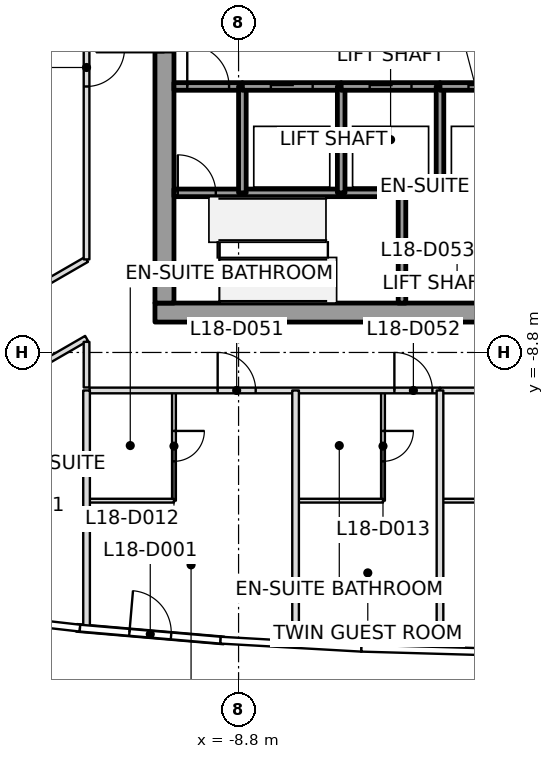
"""IFC4 building model, lengths in metres.
Left out: names, types, materials, properties, quantities, classifications, styles, units other than length and angle.
Written with IfcOpenShell. Run it as: python <this file> out.ifc"""

import sys

from ifc_helpers import new_model, si_unit, direction, frame, frame_2d, origin, place, context, subcontext, project, spatial, rectangle, extrude, element, fill, save


model = new_model("IFC4")
c1 = context("Model", 3, precision=1e-05, world=origin(), true_north=direction((0.0, 1.0)))
c2 = subcontext(c1, "Body", "Model", "MODEL_VIEW")
j1 = project(units=[si_unit("LENGTHUNIT", "METRE"), si_unit("PLANEANGLEUNIT", "RADIAN")], contexts=[c1])
p1 = place(None, origin())
s1 = spatial("IfcSite", under=j1, at=p1, CompositionType="ELEMENT")
p2 = place(p1, origin())
s2 = spatial("IfcBuilding", under=s1, at=p2, CompositionType="ELEMENT")
p3 = place(p2, frame((0.0, 0.0, 88.7)))
s3 = spatial("IfcBuildingStorey", under=s2, at=p3, CompositionType="ELEMENT", Elevation=88.7)
p4 = place(p3, frame((-11.0, -7.75, 0.0), z_axis=(0.0, 0.0, 1.0), x_axis=(1.0, 0.0, 0.0)))
e1 = element("IfcWall", 1, at=p4, inside=s3, PredefinedType="SHEAR", context=c2, shape_type="SweptSolid", body=[
    extrude(rectangle(XDim=22.0, YDim=0.5, at=frame_2d((11.0, 0.0))), origin(), (0.0, 0.0, 1.0), 3.7),
])
p5 = place(p4, frame((10.45, 0.0, 0.0)))
e2 = element("IfcOpeningElement", 2, at=p5, cuts=e1, PredefinedType="OPENING", context=c2, shape_type="SweptSolid", body=[
    extrude(rectangle(XDim=1.1, YDim=2.1, at=frame_2d((0.55, 1.05))), frame((0.0, 0.25, 0.0), z_axis=(0.0, -1.0, 0.0), x_axis=(1.0, 0.0, 0.0)), (0.0, 0.0, 1.0), 0.5),
])
p6 = place(p3, frame((-10.75, -7.5, 0.0), z_axis=(0.0, 0.0, 1.0), x_axis=(0.0, 1.0, 0.0)))
e3 = element("IfcWall", 3, at=p6, inside=s3, PredefinedType="SHEAR", context=c2, shape_type="SweptSolid", body=[
    extrude(rectangle(XDim=15.0, YDim=0.5, at=frame_2d((7.5, 0.0))), origin(), (0.0, 0.0, 1.0), 3.7),
])
p7 = place(p6, frame((6.6, 0.0, 0.0)))
e4 = element("IfcOpeningElement", 4, at=p7, cuts=e3, PredefinedType="OPENING", context=c2, shape_type="SweptSolid", body=[
    extrude(rectangle(XDim=1.8, YDim=2.1, at=frame_2d((0.9, 1.05))), frame((0.0, 0.25, 0.0), z_axis=(0.0, -1.0, 0.0), x_axis=(1.0, 0.0, 0.0)), (0.0, 0.0, 1.0), 0.5),
])
p8 = place(p3, frame((-13.063, -16.047, 0.0), z_axis=(0.0, 0.0, 1.0), x_axis=(0.996355943682, -0.085292634444, 0.0)))
e5 = element("IfcWall", 5, at=p8, inside=s3, PredefinedType="SOLIDWALL", context=c2, shape_type="SweptSolid", body=[
    extrude(rectangle(XDim=3.893, YDim=0.2, at=frame_2d((1.946, 0.0))), origin(), (0.0, 0.0, 1.0), 3.017),
])
p9 = place(p8, frame((1.396, 0.0, 0.0)))
e6 = element("IfcOpeningElement", 6, at=p9, cuts=e5, PredefinedType="OPENING", context=c2, shape_type="SweptSolid", body=[
    extrude(rectangle(XDim=1.1, YDim=2.1, at=frame_2d((0.55, 1.05))), frame((0.0, 0.1, 0.0), z_axis=(0.0, -1.0, 0.0), x_axis=(1.0, 0.0, 0.0)), (0.0, 0.0, 1.0), 0.2),
])
p10 = place(p3, frame((-10.5, -4.6, 0.0), z_axis=(0.0, 0.0, 1.0), x_axis=(1.0, 0.0, 0.0)))
e7 = element("IfcWall", 7, at=p10, inside=s3, PredefinedType="SOLIDWALL", context=c2, shape_type="SweptSolid", body=[
    extrude(rectangle(XDim=1.8, YDim=0.2, at=frame_2d((0.9, 0.0))), origin(), (0.0, 0.0, 1.0), 3.55),
])
p11 = place(p10, frame((0.1, 0.0, 0.0)))
e8 = element("IfcOpeningElement", 8, at=p11, cuts=e7, PredefinedType="OPENING", context=c2, shape_type="SweptSolid", body=[
    extrude(rectangle(XDim=1.0, YDim=2.1, at=frame_2d((0.5, 1.05))), frame((0.0, 0.1, 0.0), z_axis=(0.0, -1.0, 0.0), x_axis=(1.0, 0.0, 0.0)), (0.0, 0.0, 1.0), 0.2),
])
p12 = place(p3, frame((-10.5, -1.8, 0.0), z_axis=(0.0, 0.0, 1.0), x_axis=(1.0, 0.0, 0.0)))
e9 = element("IfcWall", 9, at=p12, inside=s3, PredefinedType="SOLIDWALL", context=c2, shape_type="SweptSolid", body=[
    extrude(rectangle(XDim=1.8, YDim=0.2, at=frame_2d((0.9, 0.0))), origin(), (0.0, 0.0, 1.0), 3.55),
])
p13 = place(p12, frame((0.35, 0.0, 0.0)))
e10 = element("IfcOpeningElement", 10, at=p13, cuts=e9, PredefinedType="OPENING", context=c2, shape_type="SweptSolid", body=[
    extrude(rectangle(XDim=1.1, YDim=2.1, at=frame_2d((0.55, 1.05))), frame((0.0, 0.1, 0.0), z_axis=(0.0, -1.0, 0.0), x_axis=(1.0, 0.0, 0.0)), (0.0, 0.0, 1.0), 0.2),
])
p14 = place(p3, frame((-8.7, -4.6, 0.0), z_axis=(0.0, 0.0, 1.0), x_axis=(1.0, 0.0, 0.0)))
e11 = element("IfcWall", 11, at=p14, inside=s3, PredefinedType="SOLIDWALL", context=c2, shape_type="SweptSolid", body=[
    extrude(rectangle(XDim=2.6, YDim=0.2, at=frame_2d((1.3, 0.0))), origin(), (0.0, 0.0, 1.0), 3.55),
])
p15 = place(p3, frame((-8.7, -4.6, 0.0), z_axis=(0.0, 0.0, 1.0), x_axis=(0.0, 1.0, 0.0)))
e12 = element("IfcWall", 12, at=p15, inside=s3, PredefinedType="SOLIDWALL", context=c2, shape_type="SweptSolid", body=[
    extrude(rectangle(XDim=2.8, YDim=0.2, at=frame_2d((1.4, 0.0))), origin(), (0.0, 0.0, 1.0), 3.55),
])
p16 = place(p3, frame((-8.7, -1.8, 0.0), z_axis=(0.0, 0.0, 1.0), x_axis=(1.0, 0.0, 0.0)))
e13 = element("IfcWall", 13, at=p16, inside=s3, PredefinedType="SOLIDWALL", context=c2, shape_type="SweptSolid", body=[
    extrude(rectangle(XDim=2.6, YDim=0.2, at=frame_2d((1.3, 0.0))), origin(), (0.0, 0.0, 1.0), 3.55),
])
p17 = place(p16, frame((0.75, 0.0, 0.0)))
e14 = element("IfcOpeningElement", 14, at=p17, cuts=e13, PredefinedType="OPENING", context=c2, shape_type="SweptSolid", body=[
    extrude(rectangle(XDim=1.1, YDim=2.1, at=frame_2d((0.55, 1.05))), frame((0.0, 0.1, 0.0), z_axis=(0.0, -1.0, 0.0), x_axis=(1.0, 0.0, 0.0)), (0.0, 0.0, 1.0), 0.2),
])
p18 = place(p3, frame((-6.1, -4.6, 0.0), z_axis=(0.0, 0.0, 1.0), x_axis=(1.0, 0.0, 0.0)))
e15 = element("IfcWall", 15, at=p18, inside=s3, PredefinedType="SOLIDWALL", context=c2, shape_type="SweptSolid", body=[
    extrude(rectangle(XDim=1.6, YDim=0.2, at=frame_2d((0.8, 0.0))), origin(), (0.0, 0.0, 1.0), 3.55),
])
p19 = place(p3, frame((-6.1, -4.6, 0.0), z_axis=(0.0, 0.0, 1.0), x_axis=(0.0, 1.0, 0.0)))
e16 = element("IfcWall", 16, at=p19, inside=s3, PredefinedType="SOLIDWALL", context=c2, shape_type="SweptSolid", body=[
    extrude(rectangle(XDim=2.8, YDim=0.2, at=frame_2d((1.4, 0.0))), origin(), (0.0, 0.0, 1.0), 3.55),
])
p20 = place(p3, frame((-6.1, -1.8, 0.0), z_axis=(0.0, 0.0, 1.0), x_axis=(1.0, 0.0, 0.0)))
e17 = element("IfcWall", 17, at=p20, inside=s3, PredefinedType="SOLIDWALL", context=c2, shape_type="SweptSolid", body=[
    extrude(rectangle(XDim=2.6, YDim=0.2, at=frame_2d((1.3, 0.0))), origin(), (0.0, 0.0, 1.0), 3.55),
])
p21 = place(p20, frame((0.75, 0.0, 0.0)))
e18 = element("IfcOpeningElement", 18, at=p21, cuts=e17, PredefinedType="OPENING", context=c2, shape_type="SweptSolid", body=[
    extrude(rectangle(XDim=1.1, YDim=2.1, at=frame_2d((0.55, 1.05))), frame((0.0, 0.1, 0.0), z_axis=(0.0, -1.0, 0.0), x_axis=(1.0, 0.0, 0.0)), (0.0, 0.0, 1.0), 0.2),
])
p22 = place(p3, frame((-4.5, -4.6, 0.0), z_axis=(0.0, 0.0, 1.0), x_axis=(0.0, -1.0, 0.0)))
e19 = element("IfcWall", 19, at=p22, inside=s3, PredefinedType="SOLIDWALL", context=c2, shape_type="SweptSolid", body=[
    extrude(rectangle(XDim=2.9, YDim=0.2, at=frame_2d((1.45, 0.0))), origin(), (0.0, 0.0, 1.0), 3.55),
])
p23 = place(p3, frame((-4.5, -4.6, 0.0), z_axis=(0.0, 0.0, 1.0), x_axis=(1.0, 0.0, 0.0)))
e20 = element("IfcWall", 20, at=p23, inside=s3, PredefinedType="SOLIDWALL", context=c2, shape_type="SweptSolid", body=[
    extrude(rectangle(XDim=1.0, YDim=0.2, at=frame_2d((0.5, 0.0))), origin(), (0.0, 0.0, 1.0), 3.55),
])
p24 = place(p3, frame((-3.5, -4.6, 0.0), z_axis=(0.0, 0.0, 1.0), x_axis=(1.0, 0.0, 0.0)))
e21 = element("IfcWall", 21, at=p24, inside=s3, PredefinedType="SOLIDWALL", context=c2, shape_type="SweptSolid", body=[
    extrude(rectangle(XDim=1.9, YDim=0.2, at=frame_2d((0.95, 0.0))), origin(), (0.0, 0.0, 1.0), 3.55),
])
p25 = place(p3, frame((-3.5, -4.6, 0.0), z_axis=(0.0, 0.0, 1.0), x_axis=(0.0, 1.0, 0.0)))
e22 = element("IfcWall", 22, at=p25, inside=s3, PredefinedType="SOLIDWALL", context=c2, shape_type="SweptSolid", body=[
    extrude(rectangle(XDim=2.8, YDim=0.2, at=frame_2d((1.4, 0.0))), origin(), (0.0, 0.0, 1.0), 3.55),
])
p26 = place(p3, frame((-3.5, -1.8, 0.0), z_axis=(0.0, 0.0, 1.0), x_axis=(1.0, 0.0, 0.0)))
e23 = element("IfcWall", 23, at=p26, inside=s3, PredefinedType="SOLIDWALL", context=c2, shape_type="SweptSolid", body=[
    extrude(rectangle(XDim=2.6, YDim=0.2, at=frame_2d((1.3, 0.0))), origin(), (0.0, 0.0, 1.0), 3.55),
])
p27 = place(p26, frame((0.75, 0.0, 0.0)))
e24 = element("IfcOpeningElement", 24, at=p27, cuts=e23, PredefinedType="OPENING", context=c2, shape_type="SweptSolid", body=[
    extrude(rectangle(XDim=1.1, YDim=2.1, at=frame_2d((0.55, 1.05))), frame((0.0, 0.1, 0.0), z_axis=(0.0, -1.0, 0.0), x_axis=(1.0, 0.0, 0.0)), (0.0, 0.0, 1.0), 0.2),
])
p28 = place(p3, frame((-12.8, -9.8, 0.0), z_axis=(0.0, 0.0, 1.0), x_axis=(0.0, -1.0, 0.0)))
e25 = element("IfcWall", 25, at=p28, inside=s3, PredefinedType="PARTITIONING", context=c2, shape_type="SweptSolid", body=[
    extrude(rectangle(XDim=6.271, YDim=0.175, at=frame_2d((3.135, 0.0))), origin(), (0.0, 0.0, 1.0), 3.15),
])
p29 = place(p3, frame((-7.3, -9.8, 0.0), z_axis=(0.0, 0.0, 1.0), x_axis=(0.0, -1.0, 0.0)))
e26 = element("IfcWall", 26, at=p29, inside=s3, PredefinedType="PARTITIONING", context=c2, shape_type="SweptSolid", body=[
    extrude(rectangle(XDim=6.696, YDim=0.175, at=frame_2d((3.348, 0.0))), origin(), (0.0, 0.0, 1.0), 3.15),
])
p30 = place(p3, frame((-3.5, -9.8, 0.0), z_axis=(0.0, 0.0, 1.0), x_axis=(0.0, -1.0, 0.0)))
e27 = element("IfcWall", 27, at=p30, inside=s3, PredefinedType="PARTITIONING", context=c2, shape_type="SweptSolid", body=[
    extrude(rectangle(XDim=6.853, YDim=0.175, at=frame_2d((3.427, 0.0))), origin(), (0.0, 0.0, 1.0), 3.15),
])
p31 = place(p3, frame((-12.8, -6.351, 0.0), z_axis=(0.0, 0.0, 1.0), x_axis=(-0.86602308164, -0.500004022051, 0.0)))
e28 = element("IfcWall", 28, at=p31, inside=s3, PredefinedType="PARTITIONING", context=c2, shape_type="SweptSolid", body=[
    extrude(rectangle(XDim=12.059, YDim=0.15, at=frame_2d((6.03, 0.0))), origin(), (0.0, 0.0, 1.0), 2.947),
])
p32 = place(p31, frame((10.809, 0.0, 0.0)))
e29 = element("IfcOpeningElement", 29, at=p32, cuts=e28, PredefinedType="OPENING", context=c2, shape_type="SweptSolid", body=[
    extrude(rectangle(XDim=1.0, YDim=2.1, at=frame_2d((0.5, 1.05))), frame((0.0, 0.075, 0.0), z_axis=(0.0, -1.0, 0.0), x_axis=(1.0, 0.0, 0.0)), (0.0, 0.0, 1.0), 0.15),
])
p33 = place(p3, frame((-22.274, -13.899, 0.0), z_axis=(0.0, 0.0, 1.0), x_axis=(0.866012401956, 0.500022519152, 0.0)))
e30 = element("IfcWall", 30, at=p33, inside=s3, PredefinedType="PARTITIONING", context=c2, shape_type="SweptSolid", body=[
    extrude(rectangle(XDim=10.94, YDim=0.15, at=frame_2d((5.47, 0.0))), origin(), (0.0, 0.0, 1.0), 2.797),
])
p34 = place(p33, frame((7.34, 0.0, 0.0)))
e31 = element("IfcOpeningElement", 31, at=p34, cuts=e30, PredefinedType="OPENING", context=c2, shape_type="SweptSolid", body=[
    extrude(rectangle(XDim=1.0, YDim=2.1, at=frame_2d((0.5, 1.05))), frame((0.0, 0.075, 0.0), z_axis=(0.0, -1.0, 0.0), x_axis=(1.0, 0.0, 0.0)), (0.0, 0.0, 1.0), 0.15),
])
p35 = place(p3, frame((-12.8, -8.521, 0.0), z_axis=(0.0, 0.0, 1.0), x_axis=(0.0, -1.0, 0.0)))
e32 = element("IfcWall", 32, at=p35, inside=s3, PredefinedType="PARTITIONING", context=c2, shape_type="SweptSolid", body=[
    extrude(rectangle(XDim=1.199, YDim=0.15, at=frame_2d((0.6, 0.0))), origin(), (0.0, 0.0, 1.0), 2.797),
])
p36 = place(p3, frame((-12.8, 9.72, 0.0), z_axis=(0.0, 0.0, 1.0), x_axis=(0.0, -1.0, 0.0)))
e33 = element("IfcWall", 33, at=p36, inside=s3, PredefinedType="PARTITIONING", context=c2, shape_type="SweptSolid", body=[
    extrude(rectangle(XDim=16.071, YDim=0.15, at=frame_2d((8.035, 0.0))), origin(), (0.0, 0.0, 1.0), 2.947),
])
p37 = place(p36, frame((1.245, 0.0, 0.0)))
e34 = element("IfcOpeningElement", 34, at=p37, cuts=e33, PredefinedType="OPENING", context=c2, shape_type="SweptSolid", body=[
    extrude(rectangle(XDim=1.0, YDim=2.1, at=frame_2d((0.5, 1.05))), frame((0.0, 0.075, 0.0), z_axis=(0.0, -1.0, 0.0), x_axis=(1.0, 0.0, 0.0)), (0.0, 0.0, 1.0), 0.15),
])
p38 = place(p36, frame((10.521, 0.0, 0.0)))
e35 = element("IfcOpeningElement", 35, at=p38, cuts=e33, PredefinedType="OPENING", context=c2, shape_type="SweptSolid", body=[
    extrude(rectangle(XDim=1.0, YDim=2.1, at=frame_2d((0.5, 1.05))), frame((0.0, 0.075, 0.0), z_axis=(0.0, -1.0, 0.0), x_axis=(1.0, 0.0, 0.0)), (0.0, 0.0, 1.0), 0.15),
])
p39 = place(p3, frame((-12.72, -9.8, 0.0), z_axis=(0.0, 0.0, 1.0), x_axis=(1.0, 0.0, 0.0)))
e36 = element("IfcWall", 36, at=p39, inside=s3, PredefinedType="PARTITIONING", context=c2, shape_type="SweptSolid", body=[
    extrude(rectangle(XDim=9.22, YDim=0.15, at=frame_2d((4.61, 0.0))), origin(), (0.0, 0.0, 1.0), 3.017),
])
p40 = place(p39, frame((3.37, 0.0, 0.0)))
e37 = element("IfcOpeningElement", 37, at=p40, cuts=e36, PredefinedType="OPENING", context=c2, shape_type="SweptSolid", body=[
    extrude(rectangle(XDim=1.0, YDim=2.1, at=frame_2d((0.5, 1.05))), frame((0.0, 0.075, 0.0), z_axis=(0.0, -1.0, 0.0), x_axis=(1.0, 0.0, 0.0)), (0.0, 0.0, 1.0), 0.15),
])
p41 = place(p39, frame((8.02, 0.0, 0.0)))
e38 = element("IfcOpeningElement", 38, at=p41, cuts=e36, PredefinedType="OPENING", context=c2, shape_type="SweptSolid", body=[
    extrude(rectangle(XDim=1.0, YDim=2.1, at=frame_2d((0.5, 1.05))), frame((0.0, 0.075, 0.0), z_axis=(0.0, -1.0, 0.0), x_axis=(1.0, 0.0, 0.0)), (0.0, 0.0, 1.0), 0.15),
])
p42 = place(p3, frame((-3.5, -9.8, 0.0), z_axis=(0.0, 0.0, 1.0), x_axis=(1.0, 0.0, 0.0)))
e39 = element("IfcWall", 39, at=p42, inside=s3, PredefinedType="PARTITIONING", context=c2, shape_type="SweptSolid", body=[
    extrude(rectangle(XDim=4.299, YDim=0.15, at=frame_2d((2.149, 0.0))), origin(), (0.0, 0.0, 1.0), 2.947),
])
p43 = place(p42, frame((2.85, 0.0, 0.0)))
e40 = element("IfcOpeningElement", 40, at=p43, cuts=e39, PredefinedType="OPENING", context=c2, shape_type="SweptSolid", body=[
    extrude(rectangle(XDim=1.0, YDim=2.1, at=frame_2d((0.5, 1.05))), frame((0.0, 0.075, 0.0), z_axis=(0.0, -1.0, 0.0), x_axis=(1.0, 0.0, 0.0)), (0.0, 0.0, 1.0), 0.15),
])
p44 = place(p3, frame((-10.5, -9.83, 0.0), z_axis=(0.0, 0.0, 1.0), x_axis=(0.0, -1.0, 0.0)))
e41 = element("IfcWall", 41, at=p44, inside=s3, PredefinedType="PARTITIONING", context=c2, shape_type="SweptSolid", body=[
    extrude(rectangle(XDim=2.87, YDim=0.1, at=frame_2d((1.435, 0.0))), origin(), (0.0, 0.0, 1.0), 3.15),
])
p45 = place(p44, frame((1.035, 0.0, 0.0)))
e42 = element("IfcOpeningElement", 42, at=p45, cuts=e41, PredefinedType="OPENING", context=c2, shape_type="SweptSolid", body=[
    extrude(rectangle(XDim=0.8, YDim=2.1, at=frame_2d((0.4, 1.05))), frame((0.0, 0.05, 0.0), z_axis=(0.0, -1.0, 0.0), x_axis=(1.0, 0.0, 0.0)), (0.0, 0.0, 1.0), 0.1),
])
p46 = place(p3, frame((-10.5, -12.7, 0.0), z_axis=(0.0, 0.0, 1.0), x_axis=(-1.0, 0.0, 0.0)))
e43 = element("IfcWall", 43, at=p46, inside=s3, PredefinedType="PARTITIONING", context=c2, shape_type="SweptSolid", body=[
    extrude(rectangle(XDim=2.27, YDim=0.1, at=frame_2d((1.135, 0.0))), origin(), (0.0, 0.0, 1.0), 3.017),
])
p47 = place(p3, frame((-5.0, -9.83, 0.0), z_axis=(0.0, 0.0, 1.0), x_axis=(0.0, -1.0, 0.0)))
e44 = element("IfcWall", 44, at=p47, inside=s3, PredefinedType="PARTITIONING", context=c2, shape_type="SweptSolid", body=[
    extrude(rectangle(XDim=2.87, YDim=0.1, at=frame_2d((1.435, 0.0))), origin(), (0.0, 0.0, 1.0), 3.017),
])
p48 = place(p47, frame((1.035, 0.0, 0.0)))
e45 = element("IfcOpeningElement", 45, at=p48, cuts=e44, PredefinedType="OPENING", context=c2, shape_type="SweptSolid", body=[
    extrude(rectangle(XDim=0.8, YDim=2.1, at=frame_2d((0.4, 1.05))), frame((0.0, 0.05, 0.0), z_axis=(0.0, -1.0, 0.0), x_axis=(1.0, 0.0, 0.0)), (0.0, 0.0, 1.0), 0.1),
])
p49 = place(p3, frame((-5.0, -12.7, 0.0), z_axis=(0.0, 0.0, 1.0), x_axis=(-1.0, 0.0, 0.0)))
e46 = element("IfcWall", 46, at=p49, inside=s3, PredefinedType="PARTITIONING", context=c2, shape_type="SweptSolid", body=[
    extrude(rectangle(XDim=2.27, YDim=0.1, at=frame_2d((1.135, 0.0))), origin(), (0.0, 0.0, 1.0), 3.15),
])
p50 = place(p3, frame((-1.2, -12.7, 0.0), z_axis=(0.0, 0.0, 1.0), x_axis=(-1.0, 0.0, 0.0)))
e47 = element("IfcWall", 47, at=p50, inside=s3, PredefinedType="PARTITIONING", context=c2, shape_type="SweptSolid", body=[
    extrude(rectangle(XDim=2.27, YDim=0.1, at=frame_2d((1.135, 0.0))), origin(), (0.0, 0.0, 1.0), 2.947),
])
p51 = place(p9, origin())
e48 = element("IfcDoor", 48, at=p51, inside=s3, OperationType="SINGLE_SWING_RIGHT", PredefinedType="DOOR", context=c2, shape_type="SweptSolid", body=[
    extrude(rectangle(XDim=1.1, YDim=2.1, at=frame_2d((0.55, 1.05))), frame((0.0, 0.025, 0.0), z_axis=(0.0, -1.0, 0.0), x_axis=(1.0, 0.0, 0.0)), (0.0, 0.0, 1.0), 0.05),
])
fill(e6, e48)
p52 = place(p38, origin())
e49 = element("IfcDoor", 49, at=p52, inside=s3, OperationType="SINGLE_SWING_RIGHT", PredefinedType="DOOR", context=c2, shape_type="SweptSolid", body=[
    extrude(rectangle(XDim=1.0, YDim=2.1, at=frame_2d((0.5, 1.05))), frame((0.0, 0.025, 0.0), z_axis=(0.0, -1.0, 0.0), x_axis=(1.0, 0.0, 0.0)), (0.0, 0.0, 1.0), 0.05),
])
fill(e35, e49)
p53 = place(p40, origin())
e50 = element("IfcDoor", 50, at=p53, inside=s3, OperationType="SINGLE_SWING_LEFT", PredefinedType="DOOR", context=c2, shape_type="SweptSolid", body=[
    extrude(rectangle(XDim=1.0, YDim=2.1, at=frame_2d((0.5, 1.05))), frame((0.0, 0.025, 0.0), z_axis=(0.0, -1.0, 0.0), x_axis=(1.0, 0.0, 0.0)), (0.0, 0.0, 1.0), 0.05),
])
fill(e37, e50)
p54 = place(p45, origin())
e51 = element("IfcDoor", 51, at=p54, inside=s3, OperationType="SINGLE_SWING_RIGHT", PredefinedType="DOOR", context=c2, shape_type="SweptSolid", body=[
    extrude(rectangle(XDim=0.8, YDim=2.1, at=frame_2d((0.4, 1.05))), frame((0.0, 0.025, 0.0), z_axis=(0.0, -1.0, 0.0), x_axis=(1.0, 0.0, 0.0)), (0.0, 0.0, 1.0), 0.05),
])
fill(e42, e51)
p55 = place(p41, origin())
e52 = element("IfcDoor", 52, at=p55, inside=s3, OperationType="SINGLE_SWING_LEFT", PredefinedType="DOOR", context=c2, shape_type="SweptSolid", body=[
    extrude(rectangle(XDim=1.0, YDim=2.1, at=frame_2d((0.5, 1.05))), frame((0.0, 0.025, 0.0), z_axis=(0.0, -1.0, 0.0), x_axis=(1.0, 0.0, 0.0)), (0.0, 0.0, 1.0), 0.05),
])
fill(e38, e52)
p56 = place(p48, origin())
e53 = element("IfcDoor", 53, at=p56, inside=s3, OperationType="SINGLE_SWING_RIGHT", PredefinedType="DOOR", context=c2, shape_type="SweptSolid", body=[
    extrude(rectangle(XDim=0.8, YDim=2.1, at=frame_2d((0.4, 1.05))), frame((0.0, 0.025, 0.0), z_axis=(0.0, -1.0, 0.0), x_axis=(1.0, 0.0, 0.0)), (0.0, 0.0, 1.0), 0.05),
])
fill(e45, e53)
p57 = place(p17, origin())
e54 = element("IfcDoor", 54, at=p57, inside=s3, OperationType="SLIDING_TO_LEFT", PredefinedType="DOOR", context=c2, shape_type="SweptSolid", body=[
    extrude(rectangle(XDim=1.1, YDim=2.1, at=frame_2d((0.55, 1.05))), frame((0.0, 0.025, 0.0), z_axis=(0.0, -1.0, 0.0), x_axis=(1.0, 0.0, 0.0)), (0.0, 0.0, 1.0), 0.05),
])
fill(e14, e54)
p58 = place(p21, origin())
e55 = element("IfcDoor", 55, at=p58, inside=s3, OperationType="SLIDING_TO_RIGHT", PredefinedType="DOOR", context=c2, shape_type="SweptSolid", body=[
    extrude(rectangle(XDim=1.1, YDim=2.1, at=frame_2d((0.55, 1.05))), frame((0.0, 0.025, 0.0), z_axis=(0.0, -1.0, 0.0), x_axis=(1.0, 0.0, 0.0)), (0.0, 0.0, 1.0), 0.05),
])
fill(e18, e55)
p59 = place(p27, origin())
e56 = element("IfcDoor", 56, at=p59, inside=s3, OperationType="SLIDING_TO_RIGHT", PredefinedType="DOOR", context=c2, shape_type="SweptSolid", body=[
    extrude(rectangle(XDim=1.1, YDim=2.1, at=frame_2d((0.55, 1.05))), frame((0.0, 0.025, 0.0), z_axis=(0.0, -1.0, 0.0), x_axis=(1.0, 0.0, 0.0)), (0.0, 0.0, 1.0), 0.05),
])
fill(e24, e56)
p60 = place(p13, origin())
e57 = element("IfcDoor", 57, at=p60, inside=s3, OperationType="SINGLE_SWING_RIGHT", PredefinedType="DOOR", context=c2, shape_type="SweptSolid", body=[
    extrude(rectangle(XDim=1.1, YDim=2.1, at=frame_2d((0.55, 1.05))), frame((0.0, 0.025, 0.0), z_axis=(0.0, -1.0, 0.0), x_axis=(1.0, 0.0, 0.0)), (0.0, 0.0, 1.0), 0.05),
])
fill(e10, e57)
p61 = place(p11, origin())
e58 = element("IfcDoor", 58, at=p61, inside=s3, OperationType="SINGLE_SWING_LEFT", PredefinedType="DOOR", context=c2, shape_type="SweptSolid", body=[
    extrude(rectangle(XDim=1.0, YDim=2.1, at=frame_2d((0.5, 1.05))), frame((0.0, 0.025, 0.0), z_axis=(0.0, -1.0, 0.0), x_axis=(1.0, 0.0, 0.0)), (0.0, 0.0, 1.0), 0.05),
])
fill(e8, e58)
p62 = place(p7, origin())
e59 = element("IfcDoor", 59, at=p62, inside=s3, OperationType="DOUBLE_DOOR_SINGLE_SWING", PredefinedType="DOOR", context=c2, shape_type="SweptSolid", body=[
    extrude(rectangle(XDim=1.8, YDim=2.1, at=frame_2d((0.9, 1.05))), frame((0.0, 0.025, 0.0), z_axis=(0.0, -1.0, 0.0), x_axis=(1.0, 0.0, 0.0)), (0.0, 0.0, 1.0), 0.05),
])
fill(e4, e59)
save(model, sys.argv[1])
